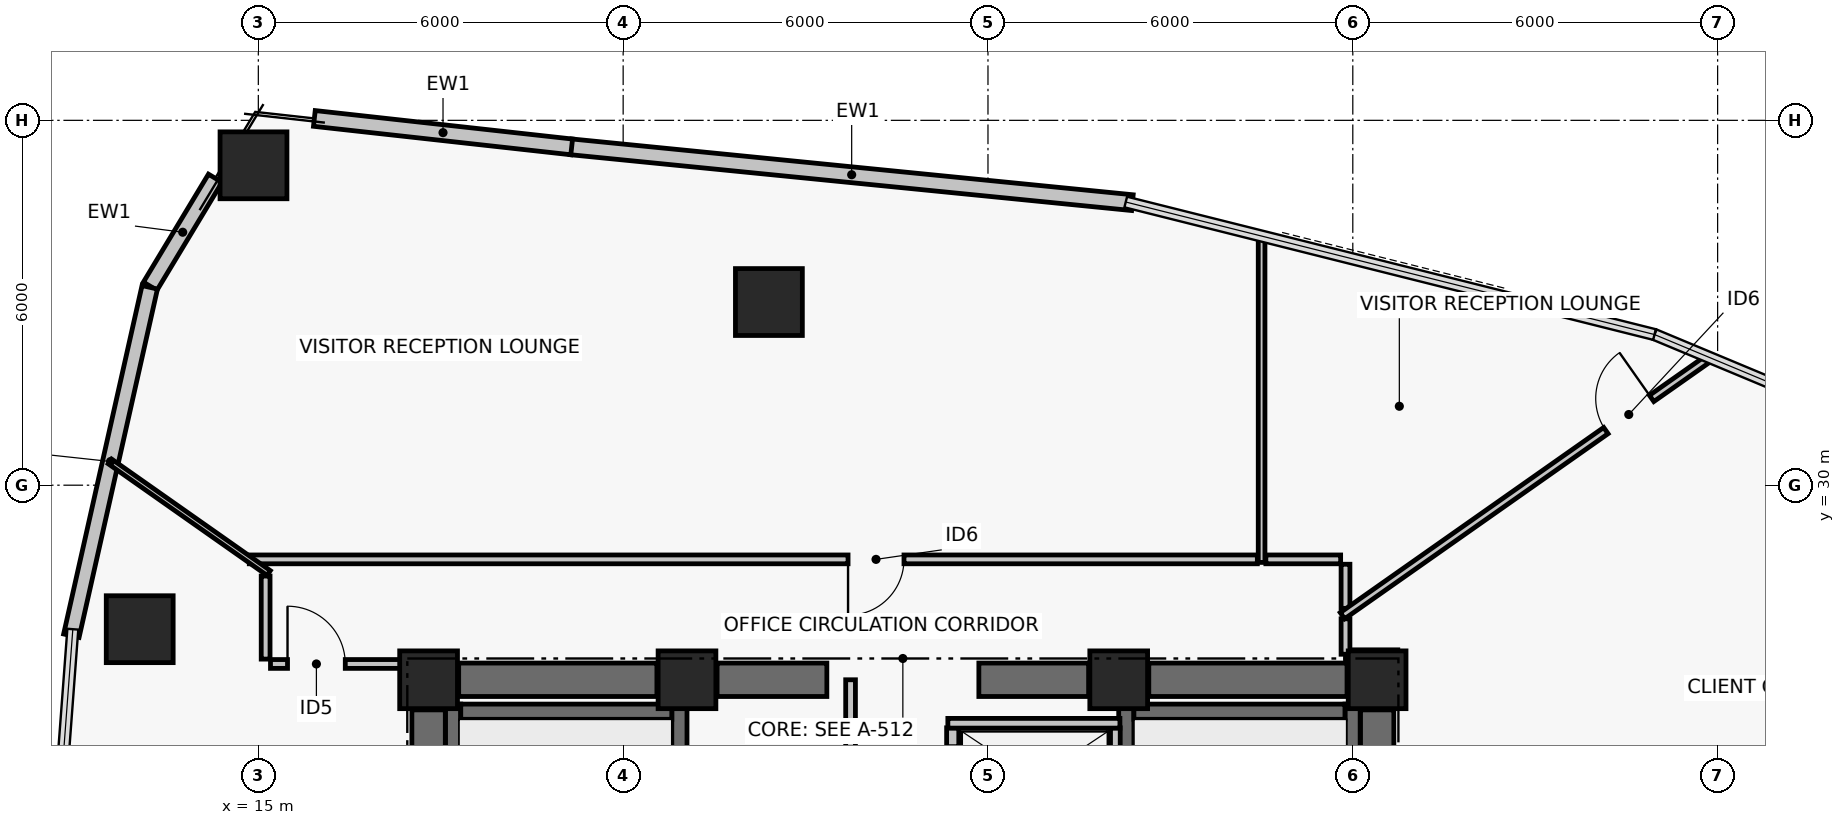
"""IFC4 building model, lengths in metres.
Left out: names, types, materials, properties, quantities, classifications, styles, units other than length and angle.
Written with IfcOpenShell. Run it as: python <this file> out.ifc"""

import sys

from ifc_helpers import new_model, si_unit, direction, frame, frame_2d, origin, origin_2d, place, context, subcontext, project, spatial, rectangle, hollow_rectangle, extrude, element, fill, save


model = new_model("IFC4")
c1 = context("Model", 3, precision=1e-05, world=origin(), true_north=direction((0.0, 1.0)))
c2 = subcontext(c1, "Body", "Model", "MODEL_VIEW")
j1 = project(units=[si_unit("LENGTHUNIT", "METRE"), si_unit("PLANEANGLEUNIT", "RADIAN")], contexts=[c1])
p1 = place(None, origin())
s1 = spatial("IfcSite", under=j1, at=p1, CompositionType="ELEMENT")
p2 = place(p1, origin())
s2 = spatial("IfcBuilding", under=s1, at=p2, CompositionType="ELEMENT")
p3 = place(p2, frame((0.0, 0.0, 169.2)))
s3 = spatial("IfcBuildingStorey", under=s2, at=p3, CompositionType="ELEMENT", Elevation=169.2)
for number, where, z_axis, x_axis in (
    (1, (17.8, 26.8, 0.0), (0.0, 0.0, 1.0), (1.0, 0.0, 0.0)),
    (2, (22.05, 26.8, 0.0), (0.0, 0.0, 1.0), (1.0, 0.0, 0.0)),
    (3, (29.15, 26.8, 0.0), (0.0, 0.0, 1.0), (1.0, 0.0, 0.0)),
    (4, (33.4, 26.8, 0.0), (0.0, 0.0, 1.0), (1.0, 0.0, 0.0)),
):
    element("IfcColumn", number, at=place(p3, frame(where, z_axis=z_axis, x_axis=x_axis)), inside=s3, PredefinedType="COLUMN", context=c2, shape_type="SweptSolid", body=[
        extrude(rectangle(XDim=0.95, YDim=0.95, at=origin_2d()), origin(), (0.0, 0.0, 1.0), 3.72),
    ])
p4 = place(p3, frame((18.295, 26.8, 0.0), z_axis=(0.0, 0.0, 1.0), x_axis=(1.0, 0.0, 0.0)))
e5 = element("IfcWall", 5, at=p4, inside=s3, PredefinedType="SHEAR", context=c2, shape_type="SweptSolid", body=[
    extrude(rectangle(XDim=3.26, YDim=0.55, at=frame_2d((1.63, 0.0))), origin(), (0.0, 0.0, 1.0), 3.44),
])
p5 = place(p3, frame((22.545, 26.8, 0.0), z_axis=(0.0, 0.0, 1.0), x_axis=(1.0, 0.0, 0.0)))
e6 = element("IfcWall", 6, at=p5, inside=s3, PredefinedType="SHEAR", context=c2, shape_type="SweptSolid", body=[
    extrude(rectangle(XDim=1.805, YDim=0.55, at=frame_2d((0.903, 0.0))), origin(), (0.0, 0.0, 1.0), 3.44),
])
p6 = place(p3, frame((26.85, 26.8, 0.0), z_axis=(0.0, 0.0, 1.0), x_axis=(1.0, 0.0, 0.0)))
e7 = element("IfcWall", 7, at=p6, inside=s3, PredefinedType="SHEAR", context=c2, shape_type="SweptSolid", body=[
    extrude(rectangle(XDim=1.805, YDim=0.55, at=frame_2d((0.902, 0.0))), origin(), (0.0, 0.0, 1.0), 3.44),
])
p7 = place(p3, frame((29.645, 26.8, 0.0), z_axis=(0.0, 0.0, 1.0), x_axis=(1.0, 0.0, 0.0)))
e8 = element("IfcWall", 8, at=p7, inside=s3, PredefinedType="SHEAR", context=c2, shape_type="SweptSolid", body=[
    extrude(rectangle(XDim=3.26, YDim=0.55, at=frame_2d((1.63, 0.0))), origin(), (0.0, 0.0, 1.0), 3.44),
])
for number, where, z_axis, x_axis in (
    (9, (17.8, 17.695, 0.0), (0.0, 0.0, 1.0), (0.0, 1.0, 0.0)),
    (10, (33.4, 17.695, 0.0), (0.0, 0.0, 1.0), (0.0, 1.0, 0.0)),
):
    element("IfcWall", number, at=place(p3, frame(where, z_axis=z_axis, x_axis=x_axis)), inside=s3, PredefinedType="SHEAR", context=c2, shape_type="SweptSolid", body=[
        extrude(rectangle(XDim=8.61, YDim=0.55, at=frame_2d((4.305, 0.0))), origin(), (0.0, 0.0, 1.0), 3.44),
    ])
p8 = place(p3, frame((18.204, 17.6, 0.0), z_axis=(0.0, 0.0, 1.0), x_axis=(0.0, 1.0, 0.0)))
e11 = element("IfcWall", 11, at=p8, inside=s3, PredefinedType="SHEAR", context=c2, shape_type="SweptSolid", body=[
    extrude(rectangle(XDim=8.8, YDim=0.25, at=frame_2d((4.4, 0.0))), origin(), (0.0, 0.0, 1.0), 3.44),
])
p9 = place(p3, frame((21.925, 17.6, 0.0), z_axis=(0.0, 0.0, 1.0), x_axis=(0.0, 1.0, 0.0)))
e12 = element("IfcWall", 12, at=p9, inside=s3, PredefinedType="SHEAR", context=c2, shape_type="SweptSolid", body=[
    extrude(rectangle(XDim=8.8, YDim=0.25, at=frame_2d((4.4, 0.0))), origin(), (0.0, 0.0, 1.0), 3.44),
])
p10 = place(p9, frame((0.35, 0.0, 0.0)))
e13 = element("IfcOpeningElement", 13, at=p10, cuts=e12, PredefinedType="OPENING", context=c2, shape_type="SweptSolid", body=[
    extrude(rectangle(XDim=1.05, YDim=2.08, at=frame_2d((0.525, 1.04))), frame((0.0, 0.135, 0.0), z_axis=(0.0, -1.0, 0.0), x_axis=(1.0, 0.0, 0.0)), (0.0, 0.0, 1.0), 0.27),
])
p11 = place(p3, frame((18.329, 26.275, 0.0), z_axis=(0.0, 0.0, 1.0), x_axis=(1.0, 0.0, 0.0)))
e14 = element("IfcWall", 14, at=p11, inside=s3, PredefinedType="SHEAR", context=c2, shape_type="SweptSolid", body=[
    extrude(rectangle(XDim=3.471, YDim=0.25, at=frame_2d((1.735, 0.0))), origin(), (0.0, 0.0, 1.0), 3.44),
])
p12 = place(p3, frame((29.275, 17.6, 0.0), z_axis=(0.0, 0.0, 1.0), x_axis=(0.0, 1.0, 0.0)))
e15 = element("IfcWall", 15, at=p12, inside=s3, PredefinedType="SHEAR", context=c2, shape_type="SweptSolid", body=[
    extrude(rectangle(XDim=8.8, YDim=0.25, at=frame_2d((4.4, 0.0))), origin(), (0.0, 0.0, 1.0), 3.44),
])
p13 = place(p12, frame((0.35, 0.0, 0.0)))
e16 = element("IfcOpeningElement", 16, at=p13, cuts=e15, PredefinedType="OPENING", context=c2, shape_type="SweptSolid", body=[
    extrude(rectangle(XDim=1.05, YDim=2.08, at=frame_2d((0.525, 1.04))), frame((0.0, 0.135, 0.0), z_axis=(0.0, -1.0, 0.0), x_axis=(1.0, 0.0, 0.0)), (0.0, 0.0, 1.0), 0.27),
])
p14 = place(p3, frame((32.996, 17.6, 0.0), z_axis=(0.0, 0.0, 1.0), x_axis=(0.0, 1.0, 0.0)))
e17 = element("IfcWall", 17, at=p14, inside=s3, PredefinedType="SHEAR", context=c2, shape_type="SweptSolid", body=[
    extrude(rectangle(XDim=8.8, YDim=0.25, at=frame_2d((4.4, 0.0))), origin(), (0.0, 0.0, 1.0), 3.44),
])
p15 = place(p3, frame((29.4, 26.275, 0.0), z_axis=(0.0, 0.0, 1.0), x_axis=(1.0, 0.0, 0.0)))
e18 = element("IfcWall", 18, at=p15, inside=s3, PredefinedType="SHEAR", context=c2, shape_type="SweptSolid", body=[
    extrude(rectangle(XDim=3.471, YDim=0.25, at=frame_2d((1.736, 0.0))), origin(), (0.0, 0.0, 1.0), 3.44),
])
for number, where, z_axis, x_axis in (
    (19, (23.397, 33.012, 0.0), (0.0, 0.0, 1.0), (1.0, 0.0, 0.0)),
    (20, (14.92, 35.26, 0.0), (0.0, 0.0, 1.0), (1.0, 0.0, 0.0)),
    (21, (13.049, 27.632, 0.0), (0.0, 0.0, 1.0), (1.0, 0.0, 0.0)),
):
    element("IfcColumn", number, at=place(p3, frame(where, z_axis=z_axis, x_axis=x_axis)), inside=s3, PredefinedType="COLUMN", context=c2, shape_type="SweptSolid", body=[
        extrude(hollow_rectangle(XDim=1.1, YDim=1.1, WallThickness=0.045, at=origin_2d()), origin(), (0.0, 0.0, 1.0), 3.72),
    ])
p16 = place(p3, frame((20.141, 35.565, 0.0), z_axis=(0.0, 0.0, 1.0), x_axis=(0.9950896707, -0.098977508888, 0.0)))
e22 = element("IfcWall", 22, at=p16, inside=s3, PredefinedType="PARTITIONING", context=c2, shape_type="SweptSolid", body=[
    extrude(rectangle(XDim=9.28, YDim=0.26, at=frame_2d((4.64, 0.0))), origin(), (0.0, 0.0, 1.0), 3.44),
])
p17 = place(p3, frame((15.921, 36.031, 0.0), z_axis=(0.0, 0.0, 1.0), x_axis=(0.993933978819, -0.109978387641, 0.0)))
e23 = element("IfcWall", 23, at=p17, inside=s3, PredefinedType="PARTITIONING", context=c2, shape_type="SweptSolid", body=[
    extrude(rectangle(XDim=4.258, YDim=0.26, at=frame_2d((2.129, 0.0))), origin(), (0.0, 0.0, 1.0), 3.44),
])
p18 = place(p3, frame((13.221, 33.272, 0.0), z_axis=(0.0, 0.0, 1.0), x_axis=(0.516157331647, 0.856493788061, 0.0)))
e24 = element("IfcWall", 24, at=p18, inside=s3, PredefinedType="PARTITIONING", context=c2, shape_type="SweptSolid", body=[
    extrude(rectangle(XDim=2.073, YDim=0.26, at=frame_2d((1.037, 0.0))), origin(), (0.0, 0.0, 1.0), 3.44),
])
p19 = place(p3, frame((11.925, 27.524, 0.0), z_axis=(0.0, 0.0, 1.0), x_axis=(0.219491422264, 0.975614429758, 0.0)))
e25 = element("IfcWall", 25, at=p19, inside=s3, PredefinedType="PARTITIONING", context=c2, shape_type="SweptSolid", body=[
    extrude(rectangle(XDim=5.873, YDim=0.26, at=frame_2d((2.937, 0.0))), origin(), (0.0, 0.0, 1.0), 3.44),
])
p20 = place(p3, frame((26.42, 24.29, 0.0), z_axis=(0.0, 0.0, 1.0), x_axis=(0.0, 1.0, 0.0)))
e26 = element("IfcWall", 26, at=p20, inside=s3, PredefinedType="PARTITIONING", context=c2, shape_type="SweptSolid", body=[
    extrude(rectangle(XDim=1.72, YDim=0.2, at=frame_2d((0.86, 0.0))), origin(), (0.0, 0.0, 1.0), 3.44),
])
p21 = place(p20, frame((0.31, 0.0, 0.0)))
e27 = element("IfcOpeningElement", 27, at=p21, cuts=e26, PredefinedType="OPENING", context=c2, shape_type="SweptSolid", body=[
    extrude(rectangle(XDim=1.1, YDim=2.08, at=frame_2d((0.55, 1.04))), frame((0.0, 0.11, 0.0), z_axis=(0.0, -1.0, 0.0), x_axis=(1.0, 0.0, 0.0)), (0.0, 0.0, 1.0), 0.22),
])
p22 = place(p3, frame((29.095, 20.56, 0.0), z_axis=(0.0, 0.0, 1.0), x_axis=(0.0, 1.0, 0.0)))
e28 = element("IfcWall", 28, at=p22, inside=s3, PredefinedType="PARTITIONING", context=c2, shape_type="SweptSolid", body=[
    extrude(rectangle(XDim=5.45, YDim=0.16, at=frame_2d((2.725, 0.0))), origin(), (0.0, 0.0, 1.0), 3.44),
])
p23 = place(p3, frame((26.34, 26.085, 0.0), z_axis=(0.0, 0.0, 1.0), x_axis=(1.0, 0.0, 0.0)))
e29 = element("IfcWall", 29, at=p23, inside=s3, PredefinedType="PARTITIONING", context=c2, shape_type="SweptSolid", body=[
    extrude(rectangle(XDim=2.83, YDim=0.16, at=frame_2d((1.415, 0.0))), origin(), (0.0, 0.0, 1.0), 3.44),
])
p24 = place(p3, frame((24.74, 22.43, 0.0), z_axis=(0.0, 0.0, 1.0), x_axis=(0.0, 1.0, 0.0)))
e30 = element("IfcWall", 30, at=p24, inside=s3, PredefinedType="PARTITIONING", context=c2, shape_type="SweptSolid", body=[
    extrude(rectangle(XDim=4.37, YDim=0.16, at=frame_2d((2.185, 0.0))), origin(), (0.0, 0.0, 1.0), 2.57),
])
p25 = place(p24, frame((1.4, 0.0, 0.0)))
e31 = element("IfcOpeningElement", 31, at=p25, cuts=e30, PredefinedType="OPENING", context=c2, shape_type="SweptSolid", body=[
    extrude(rectangle(XDim=0.98, YDim=2.06, at=frame_2d((0.49, 1.03))), frame((0.0, 0.09, 0.0), z_axis=(0.0, -1.0, 0.0), x_axis=(1.0, 0.0, 0.0)), (0.0, 0.0, 1.0), 0.18),
])
p26 = place(p3, frame((33.74, 27.22, 0.0), z_axis=(0.0, 0.0, 1.0), x_axis=(-1.0, 0.0, 0.0)))
e32 = element("IfcWall", 32, at=p26, inside=s3, PredefinedType="PARTITIONING", context=c2, shape_type="SweptSolid", body=[
    extrude(rectangle(XDim=0.86, YDim=0.145, at=frame_2d((0.43, 0.0))), origin(), (0.0, 0.0, 1.0), 2.57),
])
p27 = place(p3, frame((32.88, 27.22, 0.0), z_axis=(0.0, 0.0, 1.0), x_axis=(0.0, 1.0, 0.0)))
e33 = element("IfcWall", 33, at=p27, inside=s3, PredefinedType="PARTITIONING", context=c2, shape_type="SweptSolid", body=[
    extrude(rectangle(XDim=0.583, YDim=0.145, at=frame_2d((0.292, 0.0))), origin(), (0.0, 0.0, 1.0), 2.57),
])
p28 = place(p3, frame((32.88, 27.974, 0.0), z_axis=(0.0, 0.0, 1.0), x_axis=(0.0, 1.0, 0.0)))
e34 = element("IfcWall", 34, at=p28, inside=s3, PredefinedType="PARTITIONING", context=c2, shape_type="SweptSolid", body=[
    extrude(rectangle(XDim=0.726, YDim=0.145, at=frame_2d((0.363, 0.0))), origin(), (0.0, 0.0, 1.0), 3.44),
])
p29 = place(p3, frame((32.8, 28.78, 0.0), z_axis=(0.0, 0.0, 1.0), x_axis=(-1.0, 0.0, 0.0)))
e35 = element("IfcWall", 35, at=p29, inside=s3, PredefinedType="PARTITIONING", context=c2, shape_type="SweptSolid", body=[
    extrude(rectangle(XDim=1.23, YDim=0.145, at=frame_2d((0.615, 0.0))), origin(), (0.0, 0.0, 1.0), 3.44),
])
p30 = place(p3, frame((31.43, 28.78, 0.0), z_axis=(0.0, 0.0, 1.0), x_axis=(-1.0, 0.0, 0.0)))
e36 = element("IfcWall", 36, at=p30, inside=s3, PredefinedType="PARTITIONING", context=c2, shape_type="SweptSolid", body=[
    extrude(rectangle(XDim=16.578, YDim=0.145, at=frame_2d((8.289, 0.0))), origin(), (0.0, 0.0, 1.0), 2.17),
])
p31 = place(p30, frame((5.811, 0.0, 0.0)))
e37 = element("IfcOpeningElement", 37, at=p31, cuts=e36, PredefinedType="OPENING", context=c2, shape_type="SweptSolid", body=[
    extrude(rectangle(XDim=0.92, YDim=2.05, at=frame_2d((0.46, 1.025))), frame((0.0, 0.083, 0.0), z_axis=(0.0, -1.0, 0.0), x_axis=(1.0, 0.0, 0.0)), (0.0, 0.0, 1.0), 0.165),
])
p32 = place(p3, frame((15.12, 28.506, 0.0), z_axis=(0.0, 0.0, 1.0), x_axis=(0.0, -1.0, 0.0)))
e38 = element("IfcWall", 38, at=p32, inside=s3, PredefinedType="PARTITIONING", context=c2, shape_type="SweptSolid", body=[
    extrude(rectangle(XDim=1.366, YDim=0.145, at=frame_2d((0.683, 0.0))), origin(), (0.0, 0.0, 1.0), 2.17),
])
p33 = place(p3, frame((15.2, 27.06, 0.0), z_axis=(0.0, 0.0, 1.0), x_axis=(1.0, 0.0, 0.0)))
e39 = element("IfcWall", 39, at=p33, inside=s3, PredefinedType="PARTITIONING", context=c2, shape_type="SweptSolid", body=[
    extrude(rectangle(XDim=2.18, YDim=0.145, at=frame_2d((1.09, 0.0))), origin(), (0.0, 0.0, 1.0), 2.17),
])
p34 = place(p33, frame((0.28, 0.0, 0.0)))
e40 = element("IfcOpeningElement", 40, at=p34, cuts=e39, PredefinedType="OPENING", context=c2, shape_type="SweptSolid", body=[
    extrude(rectangle(XDim=0.95, YDim=2.06, at=frame_2d((0.475, 1.03))), frame((0.0, 0.083, 0.0), z_axis=(0.0, -1.0, 0.0), x_axis=(1.0, 0.0, 0.0)), (0.0, 0.0, 1.0), 0.165),
])
p35 = place(p3, frame((31.5, 28.73, 0.0), z_axis=(0.0, 0.0, 1.0), x_axis=(0.0, 1.0, 0.0)))
e41 = element("IfcWall", 41, at=p35, inside=s3, PredefinedType="PARTITIONING", context=c2, shape_type="SweptSolid", body=[
    extrude(rectangle(XDim=5.377, YDim=0.11, at=frame_2d((2.689, 0.0))), origin(), (0.0, 0.0, 1.0), 3.44),
])
p36 = place(p3, frame((32.83, 27.854, 0.0), z_axis=(0.0, 0.0, 1.0), x_axis=(0.818197573469, 0.574937153756, 0.0)))
e42 = element("IfcWall", 42, at=p36, inside=s3, PredefinedType="PARTITIONING", context=c2, shape_type="SweptSolid", body=[
    extrude(rectangle(XDim=7.395, YDim=0.125, at=frame_2d((3.697, 0.0))), origin(), (0.0, 0.0, 1.0), 3.44),
])
p37 = place(p36, frame((5.295, 0.0, 0.0)))
e43 = element("IfcOpeningElement", 43, at=p37, cuts=e42, PredefinedType="OPENING", context=c2, shape_type="SweptSolid", body=[
    extrude(rectangle(XDim=0.92, YDim=2.05, at=frame_2d((0.46, 1.025))), frame((0.0, 0.073, 0.0), z_axis=(0.0, -1.0, 0.0), x_axis=(1.0, 0.0, 0.0)), (0.0, 0.0, 1.0), 0.145),
])
p38 = place(p3, frame((12.56, 30.391, 0.0), z_axis=(0.0, 0.0, 1.0), x_axis=(0.818166400988, -0.574981513002, 0.0)))
e44 = element("IfcWall", 44, at=p38, inside=s3, PredefinedType="PARTITIONING", context=c2, shape_type="SweptSolid", body=[
    extrude(rectangle(XDim=3.19, YDim=0.095, at=frame_2d((1.595, 0.0))), origin(), (0.0, 0.0, 1.0), 2.87),
])
p39 = place(p31, origin())
e45 = element("IfcDoor", 45, at=p39, inside=s3, OperationType="SINGLE_SWING_RIGHT", PredefinedType="DOOR", context=c2, shape_type="SweptSolid", body=[
    extrude(rectangle(XDim=0.92, YDim=2.05, at=frame_2d((0.46, 1.025))), frame((0.0, 0.025, 0.0), z_axis=(0.0, -1.0, 0.0), x_axis=(1.0, 0.0, 0.0)), (0.0, 0.0, 1.0), 0.05),
])
fill(e37, e45)
p40 = place(p34, origin())
e46 = element("IfcDoor", 46, at=p40, inside=s3, OperationType="SINGLE_SWING_LEFT", PredefinedType="DOOR", context=c2, shape_type="SweptSolid", body=[
    extrude(rectangle(XDim=0.95, YDim=2.06, at=frame_2d((0.475, 1.03))), frame((0.0, 0.025, 0.0), z_axis=(0.0, -1.0, 0.0), x_axis=(1.0, 0.0, 0.0)), (0.0, 0.0, 1.0), 0.05),
])
fill(e40, e46)
p41 = place(p37, origin())
e47 = element("IfcDoor", 47, at=p41, inside=s3, OperationType="SINGLE_SWING_RIGHT", PredefinedType="DOOR", context=c2, shape_type="SweptSolid", body=[
    extrude(rectangle(XDim=0.92, YDim=2.05, at=frame_2d((0.46, 1.025))), frame((0.0, 0.025, 0.0), z_axis=(0.0, -1.0, 0.0), x_axis=(1.0, 0.0, 0.0)), (0.0, 0.0, 1.0), 0.05),
])
fill(e43, e47)
save(model, sys.argv[1])
